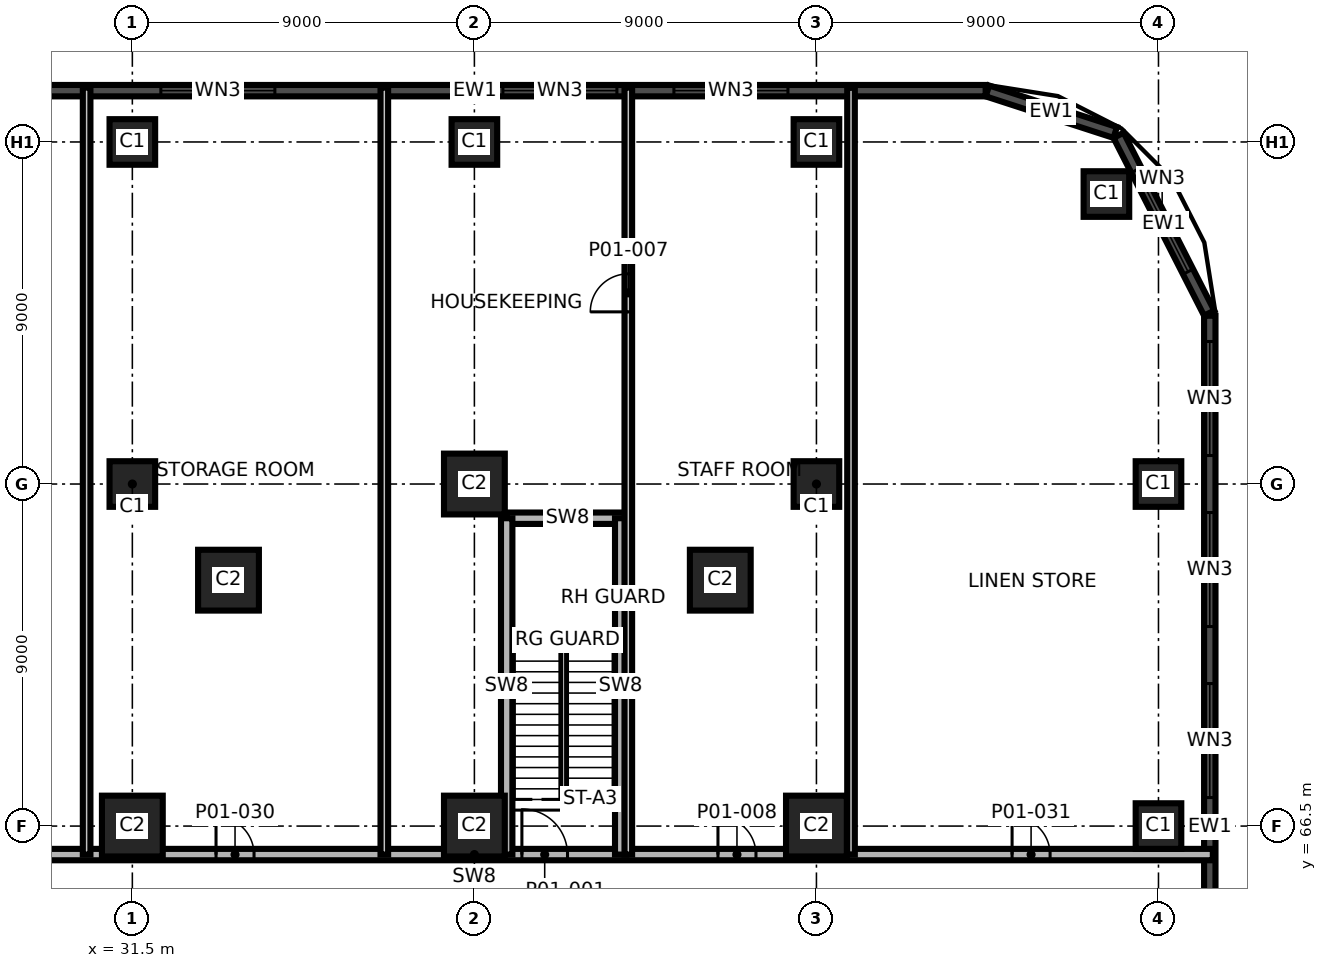
"""IFC4 building model, lengths in metres.
Left out: names, types, materials, properties, quantities, classifications, styles, units other than length and angle.
Written with IfcOpenShell. Run it as: python <this file> out.ifc"""

import sys

from ifc_helpers import new_model, si_unit, direction, frame, frame_2d, origin, origin_2d, place, context, subcontext, project, spatial, rectangle, extrude, element, fill, save


model = new_model("IFC4")
c1 = context("Model", 3, precision=1e-05, world=origin(), true_north=direction((0.0, 1.0)))
c2 = subcontext(c1, "Body", "Model", "MODEL_VIEW")
j1 = project(units=[si_unit("LENGTHUNIT", "METRE"), si_unit("PLANEANGLEUNIT", "RADIAN")], contexts=[c1])
p1 = place(None, origin())
s1 = spatial("IfcSite", under=j1, at=p1, CompositionType="ELEMENT")
p2 = place(p1, origin())
s2 = spatial("IfcBuilding", under=s1, at=p2, CompositionType="ELEMENT")
p3 = place(p2, frame((0.0, 0.0, 8.0)))
s3 = spatial("IfcBuildingStorey", under=s2, at=p3, CompositionType="ELEMENT", Elevation=8.0)
for number, where, z_axis, x_axis in (
    (1, (31.5, 66.5, 0.0), (0.0, 0.0, 1.0), (1.0, 0.0, 0.0)),
    (2, (40.5, 66.5, 0.0), (0.0, 0.0, 1.0), (1.0, 0.0, 0.0)),
    (3, (49.5, 66.5, 0.0), (0.0, 0.0, 1.0), (1.0, 0.0, 0.0)),
):
    element("IfcColumn", number, at=place(p3, frame(where, z_axis=z_axis, x_axis=x_axis)), inside=s3, PredefinedType="COLUMN", context=c2, shape_type="SweptSolid", body=[
        extrude(rectangle(XDim=1.6, YDim=1.6, at=origin_2d()), origin(), (0.0, 0.0, 1.0), 5.5),
    ])
for number, where, z_axis, x_axis in (
    (4, (58.5, 66.5, 0.0), (0.0, 0.0, 1.0), (1.0, 0.0, 0.0)),
    (5, (31.5, 75.5, 0.0), (0.0, 0.0, 1.0), (1.0, 0.0, 0.0)),
):
    element("IfcColumn", number, at=place(p3, frame(where, z_axis=z_axis, x_axis=x_axis)), inside=s3, PredefinedType="COLUMN", context=c2, shape_type="SweptSolid", body=[
        extrude(rectangle(XDim=1.2, YDim=1.2, at=origin_2d()), origin(), (0.0, 0.0, 1.0), 5.5),
    ])
p4 = place(p3, frame((40.5, 75.5, 0.0), z_axis=(0.0, 0.0, 1.0), x_axis=(1.0, 0.0, 0.0)))
e6 = element("IfcColumn", 6, at=p4, inside=s3, PredefinedType="COLUMN", context=c2, shape_type="SweptSolid", body=[
    extrude(rectangle(XDim=1.6, YDim=1.6, at=origin_2d()), origin(), (0.0, 0.0, 1.0), 5.5),
])
for number, where, z_axis, x_axis in (
    (7, (49.5, 75.5, 0.0), (0.0, 0.0, 1.0), (1.0, 0.0, 0.0)),
    (8, (58.5, 75.5, 0.0), (0.0, 0.0, 1.0), (1.0, 0.0, 0.0)),
    (9, (57.13, 83.13, 0.0), (0.0, 0.0, 1.0), (1.0, 0.0, 0.0)),
    (10, (31.5, 84.5, 0.0), (0.0, 0.0, 1.0), (1.0, 0.0, 0.0)),
    (11, (40.5, 84.5, 0.0), (0.0, 0.0, 1.0), (1.0, 0.0, 0.0)),
    (12, (49.5, 84.5, 0.0), (0.0, 0.0, 1.0), (1.0, 0.0, 0.0)),
):
    element("IfcColumn", number, at=place(p3, frame(where, z_axis=z_axis, x_axis=x_axis)), inside=s3, PredefinedType="COLUMN", context=c2, shape_type="SweptSolid", body=[
        extrude(rectangle(XDim=1.2, YDim=1.2, at=origin_2d()), origin(), (0.0, 0.0, 1.0), 5.5),
    ])
for number, where, z_axis, x_axis in (
    (13, (34.03, 72.97, 0.0), (0.0, 0.0, 1.0), (1.0, 0.0, 0.0)),
    (14, (46.97, 72.97, 0.0), (0.0, 0.0, 1.0), (1.0, 0.0, 0.0)),
):
    element("IfcColumn", number, at=place(p3, frame(where, z_axis=z_axis, x_axis=x_axis)), inside=s3, PredefinedType="COLUMN", context=c2, shape_type="SweptSolid", body=[
        extrude(rectangle(XDim=1.6, YDim=1.6, at=origin_2d()), origin(), (0.0, 0.0, 1.0), 5.5),
    ])
p5 = place(p3, frame((59.85, 53.0, 0.0), z_axis=(0.0, 0.0, 1.0), x_axis=(0.0, 1.0, 0.0)))
e15 = element("IfcWall", 15, at=p5, inside=s3, PredefinedType="SOLIDWALL", context=c2, shape_type="SweptSolid", body=[
    extrude(rectangle(XDim=26.928, YDim=0.3, at=frame_2d((13.464, 0.0))), origin(), (0.0, 0.0, 1.0), 5.2),
])
p6 = place(p5, frame((5.25, 0.0, 0.9)))
e16 = element("IfcOpeningElement", 16, at=p6, cuts=e15, PredefinedType="OPENING", context=c2, shape_type="SweptSolid", body=[
    extrude(rectangle(XDim=3.0, YDim=2.4, at=frame_2d((1.5, 1.2))), frame((0.0, 0.16, 0.0), z_axis=(0.0, -1.0, 0.0), x_axis=(1.0, 0.0, 0.0)), (0.0, 0.0, 1.0), 0.32),
])
p7 = place(p5, frame((14.25, 0.0, 0.9)))
e17 = element("IfcOpeningElement", 17, at=p7, cuts=e15, PredefinedType="OPENING", context=c2, shape_type="SweptSolid", body=[
    extrude(rectangle(XDim=3.0, YDim=2.4, at=frame_2d((1.5, 1.2))), frame((0.0, 0.16, 0.0), z_axis=(0.0, -1.0, 0.0), x_axis=(1.0, 0.0, 0.0)), (0.0, 0.0, 1.0), 0.32),
])
p8 = place(p5, frame((18.75, 0.0, 0.9)))
e18 = element("IfcOpeningElement", 18, at=p8, cuts=e15, PredefinedType="OPENING", context=c2, shape_type="SweptSolid", body=[
    extrude(rectangle(XDim=3.0, YDim=2.4, at=frame_2d((1.5, 1.2))), frame((0.0, 0.16, 0.0), z_axis=(0.0, -1.0, 0.0), x_axis=(1.0, 0.0, 0.0)), (0.0, 0.0, 1.0), 0.32),
])
p9 = place(p5, frame((23.25, 0.0, 0.9)))
e19 = element("IfcOpeningElement", 19, at=p9, cuts=e15, PredefinedType="OPENING", context=c2, shape_type="SweptSolid", body=[
    extrude(rectangle(XDim=3.0, YDim=2.4, at=frame_2d((1.5, 1.2))), frame((0.0, 0.16, 0.0), z_axis=(0.0, -1.0, 0.0), x_axis=(1.0, 0.0, 0.0)), (0.0, 0.0, 1.0), 0.32),
])
p10 = place(p3, frame((59.834, 79.996, 0.0), z_axis=(0.0, 0.0, 1.0), x_axis=(-0.454006562826, 0.890998339455, 0.0)))
e20 = element("IfcWall", 20, at=p10, inside=s3, PredefinedType="SOLIDWALL", context=c2, shape_type="SweptSolid", body=[
    extrude(rectangle(XDim=5.252, YDim=0.3, at=frame_2d((2.626, 0.0))), origin(), (0.0, 0.0, 1.0), 5.2),
])
p11 = place(p10, frame((1.224, 0.0, 0.9)))
e21 = element("IfcOpeningElement", 21, at=p11, cuts=e20, PredefinedType="OPENING", context=c2, shape_type="SweptSolid", body=[
    extrude(rectangle(XDim=3.0, YDim=2.4, at=frame_2d((1.5, 1.2))), frame((0.0, 0.16, 0.0), z_axis=(0.0, -1.0, 0.0), x_axis=(1.0, 0.0, 0.0)), (0.0, 0.0, 1.0), 0.32),
])
p12 = place(p3, frame((57.362, 84.75, 0.0), z_axis=(0.0, 0.0, 1.0), x_axis=(-0.951038127287, 0.309073584194, 0.0)))
e22 = element("IfcWall", 22, at=p12, inside=s3, PredefinedType="SOLIDWALL", context=c2, shape_type="SweptSolid", body=[
    extrude(rectangle(XDim=3.536, YDim=0.3, at=frame_2d((1.768, 0.0))), origin(), (0.0, 0.0, 1.0), 5.2),
])
p13 = place(p3, frame((53.952, 85.85, 0.0), z_axis=(0.0, 0.0, 1.0), x_axis=(-1.0, 0.0, 0.0)))
e23 = element("IfcWall", 23, at=p13, inside=s3, PredefinedType="SOLIDWALL", context=c2, shape_type="SweptSolid", body=[
    extrude(rectangle(XDim=26.88, YDim=0.3, at=frame_2d((13.44, 0.0))), origin(), (0.0, 0.0, 1.0), 5.2),
])
p14 = place(p13, frame((5.202, 0.0, 0.9)))
e24 = element("IfcOpeningElement", 24, at=p14, cuts=e23, PredefinedType="OPENING", context=c2, shape_type="SweptSolid", body=[
    extrude(rectangle(XDim=3.0, YDim=2.4, at=frame_2d((1.5, 1.2))), frame((0.0, 0.16, 0.0), z_axis=(0.0, -1.0, 0.0), x_axis=(1.0, 0.0, 0.0)), (0.0, 0.0, 1.0), 0.32),
])
p15 = place(p13, frame((9.702, 0.0, 0.9)))
e25 = element("IfcOpeningElement", 25, at=p15, cuts=e23, PredefinedType="OPENING", context=c2, shape_type="SweptSolid", body=[
    extrude(rectangle(XDim=3.0, YDim=2.4, at=frame_2d((1.5, 1.2))), frame((0.0, 0.16, 0.0), z_axis=(0.0, -1.0, 0.0), x_axis=(1.0, 0.0, 0.0)), (0.0, 0.0, 1.0), 0.32),
])
p16 = place(p13, frame((18.702, 0.0, 0.9)))
e26 = element("IfcOpeningElement", 26, at=p16, cuts=e23, PredefinedType="OPENING", context=c2, shape_type="SweptSolid", body=[
    extrude(rectangle(XDim=3.0, YDim=2.4, at=frame_2d((1.5, 1.2))), frame((0.0, 0.16, 0.0), z_axis=(0.0, -1.0, 0.0), x_axis=(1.0, 0.0, 0.0)), (0.0, 0.0, 1.0), 0.32),
])
p17 = place(p3, frame((21.07, 65.75, 0.0), z_axis=(0.0, 0.0, 1.0), x_axis=(1.0, 0.0, 0.0)))
e27 = element("IfcWall", 27, at=p17, inside=s3, PredefinedType="SHEAR", context=c2, shape_type="SweptSolid", body=[
    extrude(rectangle(XDim=38.86, YDim=0.3, at=frame_2d((19.43, 0.0))), origin(), (0.0, 0.0, 1.0), 5.2),
])
p18 = place(p17, frame((20.68, 0.0, 0.0)))
e28 = element("IfcOpeningElement", 28, at=p18, cuts=e27, PredefinedType="OPENING", context=c2, shape_type="SweptSolid", body=[
    extrude(rectangle(XDim=1.2, YDim=2.1, at=frame_2d((0.6, 1.05))), frame((0.0, 0.16, 0.0), z_axis=(0.0, -1.0, 0.0), x_axis=(1.0, 0.0, 0.0)), (0.0, 0.0, 1.0), 0.32),
])
p19 = place(p17, frame((25.839, 0.0, 0.0)))
e29 = element("IfcOpeningElement", 29, at=p19, cuts=e27, PredefinedType="OPENING", context=c2, shape_type="SweptSolid", body=[
    extrude(rectangle(XDim=1.0, YDim=2.1, at=frame_2d((0.5, 1.05))), frame((0.0, 0.16, 0.0), z_axis=(0.0, -1.0, 0.0), x_axis=(1.0, 0.0, 0.0)), (0.0, 0.0, 1.0), 0.32),
])
p20 = place(p17, frame((4.083, 0.0, 0.0)))
e30 = element("IfcOpeningElement", 30, at=p20, cuts=e27, PredefinedType="OPENING", context=c2, shape_type="SweptSolid", body=[
    extrude(rectangle(XDim=1.0, YDim=2.1, at=frame_2d((0.5, 1.05))), frame((0.0, 0.16, 0.0), z_axis=(0.0, -1.0, 0.0), x_axis=(1.0, 0.0, 0.0)), (0.0, 0.0, 1.0), 0.32),
])
p21 = place(p17, frame((12.632, 0.0, 0.0)))
e31 = element("IfcOpeningElement", 31, at=p21, cuts=e27, PredefinedType="OPENING", context=c2, shape_type="SweptSolid", body=[
    extrude(rectangle(XDim=1.0, YDim=2.1, at=frame_2d((0.5, 1.05))), frame((0.0, 0.16, 0.0), z_axis=(0.0, -1.0, 0.0), x_axis=(1.0, 0.0, 0.0)), (0.0, 0.0, 1.0), 0.32),
])
p22 = place(p17, frame((33.578, 0.0, 0.0)))
e32 = element("IfcOpeningElement", 32, at=p22, cuts=e27, PredefinedType="OPENING", context=c2, shape_type="SweptSolid", body=[
    extrude(rectangle(XDim=1.0, YDim=2.1, at=frame_2d((0.5, 1.05))), frame((0.0, 0.16, 0.0), z_axis=(0.0, -1.0, 0.0), x_axis=(1.0, 0.0, 0.0)), (0.0, 0.0, 1.0), 0.32),
])
p23 = place(p3, frame((41.35, 74.6, 0.0), z_axis=(0.0, 0.0, 1.0), x_axis=(1.0, 0.0, 0.0)))
e33 = element("IfcWall", 33, at=p23, inside=s3, PredefinedType="SHEAR", context=c2, shape_type="SweptSolid", body=[
    extrude(rectangle(XDim=3.2, YDim=0.3, at=frame_2d((1.6, 0.0))), origin(), (0.0, 0.0, 1.0), 5.2),
])
for number, where, z_axis, x_axis in (
    (34, (30.297, 65.75, 0.0), (0.0, 0.0, 1.0), (0.0, 1.0, 0.0)),
    (35, (38.13, 65.75, 0.0), (0.0, 0.0, 1.0), (0.0, 1.0, 0.0)),
):
    element("IfcWall", number, at=place(p3, frame(where, z_axis=z_axis, x_axis=x_axis)), inside=s3, PredefinedType="PARTITIONING", context=c2, shape_type="SweptSolid", body=[
        extrude(rectangle(XDim=20.18, YDim=0.2, at=frame_2d((10.09, 0.0))), origin(), (0.0, 0.0, 1.0), 5.2),
    ])
for number, where, z_axis, x_axis in (
    (36, (41.35, 65.75, 0.0), (0.0, 0.0, 1.0), (0.0, 1.0, 0.0)),
    (37, (44.35, 65.75, 0.0), (0.0, 0.0, 1.0), (0.0, 1.0, 0.0)),
):
    element("IfcWall", number, at=place(p3, frame(where, z_axis=z_axis, x_axis=x_axis)), inside=s3, PredefinedType="SHEAR", context=c2, shape_type="SweptSolid", body=[
        extrude(rectangle(XDim=8.85, YDim=0.3, at=frame_2d((4.425, 0.0))), origin(), (0.0, 0.0, 1.0), 5.2),
    ])
p24 = place(p3, frame((44.55, 65.75, 0.0), z_axis=(0.0, 0.0, 1.0), x_axis=(0.0, 1.0, 0.0)))
e38 = element("IfcWall", 38, at=p24, inside=s3, PredefinedType="PARTITIONING", context=c2, shape_type="SweptSolid", body=[
    extrude(rectangle(XDim=20.18, YDim=0.2, at=frame_2d((10.09, 0.0))), origin(), (0.0, 0.0, 1.0), 5.2),
])
p25 = place(p24, frame((14.28, 0.0, 0.0)))
e39 = element("IfcOpeningElement", 39, at=p25, cuts=e38, PredefinedType="OPENING", context=c2, shape_type="SweptSolid", body=[
    extrude(rectangle(XDim=1.0, YDim=2.1, at=frame_2d((0.5, 1.05))), frame((0.0, 0.11, 0.0), z_axis=(0.0, -1.0, 0.0), x_axis=(1.0, 0.0, 0.0)), (0.0, 0.0, 1.0), 0.22),
])
p26 = place(p3, frame((50.41, 65.75, 0.0), z_axis=(0.0, 0.0, 1.0), x_axis=(0.0, 1.0, 0.0)))
e40 = element("IfcWall", 40, at=p26, inside=s3, PredefinedType="PARTITIONING", context=c2, shape_type="SweptSolid", body=[
    extrude(rectangle(XDim=20.18, YDim=0.2, at=frame_2d((10.09, 0.0))), origin(), (0.0, 0.0, 1.0), 5.2),
])
p27 = place(p7, origin())
e41 = element("IfcWindow", 41, at=p27, inside=s3, PartitioningType="SINGLE_PANEL", PredefinedType="WINDOW", context=c2, shape_type="SweptSolid", body=[
    extrude(rectangle(XDim=3.0, YDim=2.4, at=frame_2d((1.5, 1.2))), frame((0.0, 0.03, 0.0), z_axis=(0.0, -1.0, 0.0), x_axis=(1.0, 0.0, 0.0)), (0.0, 0.0, 1.0), 0.06),
])
fill(e17, e41)
p28 = place(p8, origin())
e42 = element("IfcWindow", 42, at=p28, inside=s3, PartitioningType="SINGLE_PANEL", PredefinedType="WINDOW", context=c2, shape_type="SweptSolid", body=[
    extrude(rectangle(XDim=3.0, YDim=2.4, at=frame_2d((1.5, 1.2))), frame((0.0, 0.03, 0.0), z_axis=(0.0, -1.0, 0.0), x_axis=(1.0, 0.0, 0.0)), (0.0, 0.0, 1.0), 0.06),
])
fill(e18, e42)
p29 = place(p9, origin())
e43 = element("IfcWindow", 43, at=p29, inside=s3, PartitioningType="SINGLE_PANEL", PredefinedType="WINDOW", context=c2, shape_type="SweptSolid", body=[
    extrude(rectangle(XDim=3.0, YDim=2.4, at=frame_2d((1.5, 1.2))), frame((0.0, 0.03, 0.0), z_axis=(0.0, -1.0, 0.0), x_axis=(1.0, 0.0, 0.0)), (0.0, 0.0, 1.0), 0.06),
])
fill(e19, e43)
p30 = place(p11, origin())
e44 = element("IfcWindow", 44, at=p30, inside=s3, PartitioningType="SINGLE_PANEL", PredefinedType="WINDOW", context=c2, shape_type="SweptSolid", body=[
    extrude(rectangle(XDim=3.0, YDim=2.4, at=frame_2d((1.5, 1.2))), frame((0.0, 0.03, 0.0), z_axis=(0.0, -1.0, 0.0), x_axis=(1.0, 0.0, 0.0)), (0.0, 0.0, 1.0), 0.06),
])
fill(e21, e44)
p31 = place(p14, origin())
e45 = element("IfcWindow", 45, at=p31, inside=s3, PartitioningType="SINGLE_PANEL", PredefinedType="WINDOW", context=c2, shape_type="SweptSolid", body=[
    extrude(rectangle(XDim=3.0, YDim=2.4, at=frame_2d((1.5, 1.2))), frame((0.0, 0.03, 0.0), z_axis=(0.0, -1.0, 0.0), x_axis=(1.0, 0.0, 0.0)), (0.0, 0.0, 1.0), 0.06),
])
fill(e24, e45)
p32 = place(p15, origin())
e46 = element("IfcWindow", 46, at=p32, inside=s3, PartitioningType="SINGLE_PANEL", PredefinedType="WINDOW", context=c2, shape_type="SweptSolid", body=[
    extrude(rectangle(XDim=3.0, YDim=2.4, at=frame_2d((1.5, 1.2))), frame((0.0, 0.03, 0.0), z_axis=(0.0, -1.0, 0.0), x_axis=(1.0, 0.0, 0.0)), (0.0, 0.0, 1.0), 0.06),
])
fill(e25, e46)
p33 = place(p16, origin())
e47 = element("IfcWindow", 47, at=p33, inside=s3, PartitioningType="SINGLE_PANEL", PredefinedType="WINDOW", context=c2, shape_type="SweptSolid", body=[
    extrude(rectangle(XDim=3.0, YDim=2.4, at=frame_2d((1.5, 1.2))), frame((0.0, 0.03, 0.0), z_axis=(0.0, -1.0, 0.0), x_axis=(1.0, 0.0, 0.0)), (0.0, 0.0, 1.0), 0.06),
])
fill(e26, e47)
p34 = place(p18, origin())
e48 = element("IfcDoor", 48, at=p34, inside=s3, OperationType="SINGLE_SWING_LEFT", PredefinedType="DOOR", context=c2, shape_type="SweptSolid", body=[
    extrude(rectangle(XDim=1.2, YDim=2.1, at=frame_2d((0.6, 1.05))), frame((0.0, 0.025, 0.0), z_axis=(0.0, -1.0, 0.0), x_axis=(1.0, 0.0, 0.0)), (0.0, 0.0, 1.0), 0.05),
])
fill(e28, e48)
p35 = place(p25, origin())
e49 = element("IfcDoor", 49, at=p35, inside=s3, OperationType="SINGLE_SWING_LEFT", PredefinedType="DOOR", context=c2, shape_type="SweptSolid", body=[
    extrude(rectangle(XDim=1.0, YDim=2.1, at=frame_2d((0.5, 1.05))), frame((0.0, 0.025, 0.0), z_axis=(0.0, -1.0, 0.0), x_axis=(1.0, 0.0, 0.0)), (0.0, 0.0, 1.0), 0.05),
])
fill(e39, e49)
p36 = place(p19, origin())
e50 = element("IfcDoor", 50, at=p36, inside=s3, OperationType="SINGLE_SWING_RIGHT", PredefinedType="DOOR", context=c2, shape_type="SweptSolid", body=[
    extrude(rectangle(XDim=1.0, YDim=2.1, at=frame_2d((0.5, 1.05))), frame((0.0, 0.025, 0.0), z_axis=(0.0, -1.0, 0.0), x_axis=(1.0, 0.0, 0.0)), (0.0, 0.0, 1.0), 0.05),
])
fill(e29, e50)
p37 = place(p21, origin())
e51 = element("IfcDoor", 51, at=p37, inside=s3, OperationType="SINGLE_SWING_RIGHT", PredefinedType="DOOR", context=c2, shape_type="SweptSolid", body=[
    extrude(rectangle(XDim=1.0, YDim=2.1, at=frame_2d((0.5, 1.05))), frame((0.0, 0.025, 0.0), z_axis=(0.0, -1.0, 0.0), x_axis=(1.0, 0.0, 0.0)), (0.0, 0.0, 1.0), 0.05),
])
fill(e31, e51)
p38 = place(p22, origin())
e52 = element("IfcDoor", 52, at=p38, inside=s3, OperationType="SINGLE_SWING_LEFT", PredefinedType="DOOR", context=c2, shape_type="SweptSolid", body=[
    extrude(rectangle(XDim=1.0, YDim=2.1, at=frame_2d((0.5, 1.05))), frame((0.0, 0.025, 0.0), z_axis=(0.0, -1.0, 0.0), x_axis=(1.0, 0.0, 0.0)), (0.0, 0.0, 1.0), 0.05),
])
fill(e32, e52)
save(model, sys.argv[1])
